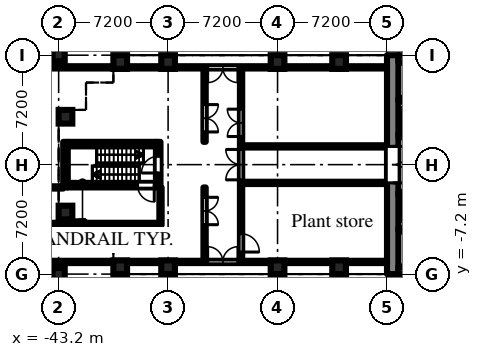
"""IFC4 building model, lengths in metres.
Left out: names, types, materials, properties, quantities, classifications, styles, units other than length and angle.
Written with IfcOpenShell. Run it as: python <this file> out.ifc"""

import sys

from ifc_helpers import new_model, si_unit, direction, frame, frame_2d, origin, origin_2d, place, context, subcontext, project, spatial, rectangle, extrude, element, fill, save


model = new_model("IFC4")
c1 = context("Model", 3, precision=1e-05, world=origin(), true_north=direction((0.0, 1.0)))
c2 = subcontext(c1, "Body", "Model", "MODEL_VIEW")
j1 = project(units=[si_unit("LENGTHUNIT", "METRE"), si_unit("PLANEANGLEUNIT", "RADIAN")], contexts=[c1])
p1 = place(None, origin())
s1 = spatial("IfcSite", under=j1, at=p1, CompositionType="ELEMENT")
p2 = place(p1, origin())
s2 = spatial("IfcBuilding", under=s1, at=p2, CompositionType="ELEMENT")
p3 = place(p2, origin())
s3 = spatial("IfcBuildingStorey", under=s2, at=p3, CompositionType="ELEMENT", Elevation=0.0)
for number, where, z_axis, x_axis in (
    (1, (-42.75, -3.15, 0.0), (0.0, 0.0, 1.0), (1.0, 0.0, 0.0)),
    (2, (-42.75, 3.15, 0.0), (0.0, 0.0, 1.0), (1.0, 0.0, 0.0)),
    (3, (-39.15, -6.75, 0.0), (0.0, 0.0, 1.0), (1.0, 0.0, 0.0)),
    (4, (-39.15, 6.75, 0.0), (0.0, 0.0, 1.0), (1.0, 0.0, 0.0)),
    (5, (-36.0, -6.75, 0.0), (0.0, 0.0, 1.0), (1.0, 0.0, 0.0)),
    (6, (-36.0, 6.75, 0.0), (0.0, 0.0, 1.0), (1.0, 0.0, 0.0)),
    (7, (-28.8, -6.75, 0.0), (0.0, 0.0, 1.0), (1.0, 0.0, 0.0)),
    (8, (-28.8, 6.75, 0.0), (0.0, 0.0, 1.0), (1.0, 0.0, 0.0)),
    (9, (-24.75, -6.75, 0.0), (0.0, 0.0, 1.0), (1.0, 0.0, 0.0)),
    (10, (-24.75, 6.75, 0.0), (0.0, 0.0, 1.0), (1.0, 0.0, 0.0)),
):
    element("IfcColumn", number, at=place(p3, frame(where, z_axis=z_axis, x_axis=x_axis)), inside=s3, PredefinedType="COLUMN", context=c2, shape_type="SweptSolid", body=[
        extrude(rectangle(XDim=0.9, YDim=0.9, at=origin_2d()), origin(), (0.0, 0.0, 1.0), 7.2),
    ])
for number, where, z_axis, x_axis in (
    (11, (-43.2, -7.2, 0.0), (0.0, 0.0, 1.0), (1.0, 0.0, 0.0)),
    (12, (-43.2, 7.2, 0.0), (0.0, 0.0, 1.0), (1.0, 0.0, 0.0)),
):
    element("IfcColumn", number, at=place(p3, frame(where, z_axis=z_axis, x_axis=x_axis)), inside=s3, PredefinedType="COLUMN", context=c2, shape_type="SweptSolid", body=[
        extrude(rectangle(XDim=0.8, YDim=0.8, at=origin_2d()), origin(), (0.0, 0.0, 1.0), 6.6),
    ])
p4 = place(p3, frame((-21.225, -7.2, 0.0), z_axis=(0.0, 0.0, 1.0), x_axis=(0.0, 1.0, 0.0)))
e13 = element("IfcWall", 13, at=p4, inside=s3, PredefinedType="SHEAR", context=c2, shape_type="SweptSolid", body=[
    extrude(rectangle(XDim=14.4, YDim=0.75, at=frame_2d((7.2, 0.0))), origin(), (0.0, 0.0, 1.0), 6.6),
])
p5 = place(p4, frame((6.0, 0.0, 0.0)))
e14 = element("IfcOpeningElement", 14, at=p5, cuts=e13, PredefinedType="OPENING", context=c2, shape_type="SweptSolid", body=[
    extrude(rectangle(XDim=2.4, YDim=2.2, at=frame_2d((1.2, 1.1))), frame((0.0, 0.385, 0.0), z_axis=(0.0, -1.0, 0.0), x_axis=(1.0, 0.0, 0.0)), (0.0, 0.0, 1.0), 0.77),
])
p6 = place(p3, frame((-7.9, 6.95, 0.0), z_axis=(0.0, 0.0, 1.0), x_axis=(-1.0, 0.0, 0.0)))
e15 = element("IfcWall", 15, at=p6, inside=s3, PredefinedType="SHEAR", context=c2, shape_type="SweptSolid", body=[
    extrude(rectangle(XDim=12.95, YDim=0.5, at=frame_2d((6.475, 0.0))), origin(), (0.0, 0.0, 1.0), 6.6),
])
p7 = place(p6, frame((5.35, 0.0, 0.0)))
e16 = element("IfcOpeningElement", 16, at=p7, cuts=e15, PredefinedType="OPENING", context=c2, shape_type="SweptSolid", body=[
    extrude(rectangle(XDim=1.1, YDim=2.1, at=frame_2d((0.55, 1.05))), frame((0.0, 0.26, 0.0), z_axis=(0.0, -1.0, 0.0), x_axis=(1.0, 0.0, 0.0)), (0.0, 0.0, 1.0), 0.52),
])
p8 = place(p3, frame((-7.9, 1.925, 0.0), z_axis=(0.0, 0.0, 1.0), x_axis=(-1.0, 0.0, 0.0)))
e17 = element("IfcWall", 17, at=p8, inside=s3, PredefinedType="SHEAR", context=c2, shape_type="SweptSolid", body=[
    extrude(rectangle(XDim=12.95, YDim=0.25, at=frame_2d((6.475, 0.0))), origin(), (0.0, 0.0, 1.0), 6.6),
])
p9 = place(p8, frame((11.425, 0.0, 0.0)))
e18 = element("IfcOpeningElement", 18, at=p9, cuts=e17, PredefinedType="OPENING", context=c2, shape_type="SweptSolid", body=[
    extrude(rectangle(XDim=1.1, YDim=2.1, at=frame_2d((0.55, 1.05))), frame((0.0, 0.135, 0.0), z_axis=(0.0, -1.0, 0.0), x_axis=(1.0, 0.0, 0.0)), (0.0, 0.0, 1.0), 0.27),
])
p10 = place(p8, frame((0.525, 0.0, 0.0)))
e19 = element("IfcOpeningElement", 19, at=p10, cuts=e17, PredefinedType="OPENING", context=c2, shape_type="SweptSolid", body=[
    extrude(rectangle(XDim=0.9, YDim=2.1, at=frame_2d((0.45, 1.05))), frame((0.0, 0.135, 0.0), z_axis=(0.0, -1.0, 0.0), x_axis=(1.0, 0.0, 0.0)), (0.0, 0.0, 1.0), 0.27),
])
p11 = place(p8, frame((2.625, 0.0, 0.0)))
e20 = element("IfcOpeningElement", 20, at=p11, cuts=e17, PredefinedType="OPENING", context=c2, shape_type="SweptSolid", body=[
    extrude(rectangle(XDim=1.1, YDim=2.1, at=frame_2d((0.55, 1.05))), frame((0.0, 0.135, 0.0), z_axis=(0.0, -1.0, 0.0), x_axis=(1.0, 0.0, 0.0)), (0.0, 0.0, 1.0), 0.27),
])
p12 = place(p8, frame((7.125, 0.0, 0.0)))
e21 = element("IfcOpeningElement", 21, at=p12, cuts=e17, PredefinedType="OPENING", context=c2, shape_type="SweptSolid", body=[
    extrude(rectangle(XDim=0.9, YDim=2.1, at=frame_2d((0.45, 1.05))), frame((0.0, 0.135, 0.0), z_axis=(0.0, -1.0, 0.0), x_axis=(1.0, 0.0, 0.0)), (0.0, 0.0, 1.0), 0.27),
])
p13 = place(p3, frame((-12.3, 4.275, 0.0), z_axis=(0.0, 0.0, 1.0), x_axis=(-1.0, 0.0, 0.0)))
e22 = element("IfcWall", 22, at=p13, inside=s3, PredefinedType="SHEAR", context=c2, shape_type="SweptSolid", body=[
    extrude(rectangle(XDim=8.55, YDim=0.25, at=frame_2d((4.275, 0.0))), origin(), (0.0, 0.0, 1.0), 6.6),
])
p14 = place(p3, frame((-7.9, -6.95, 0.0), z_axis=(0.0, 0.0, 1.0), x_axis=(-1.0, 0.0, 0.0)))
e23 = element("IfcWall", 23, at=p14, inside=s3, PredefinedType="SHEAR", context=c2, shape_type="SweptSolid", body=[
    extrude(rectangle(XDim=12.95, YDim=0.5, at=frame_2d((6.475, 0.0))), origin(), (0.0, 0.0, 1.0), 6.6),
])
p15 = place(p14, frame((5.35, 0.0, 0.0)))
e24 = element("IfcOpeningElement", 24, at=p15, cuts=e23, PredefinedType="OPENING", context=c2, shape_type="SweptSolid", body=[
    extrude(rectangle(XDim=1.1, YDim=2.1, at=frame_2d((0.55, 1.05))), frame((0.0, 0.26, 0.0), z_axis=(0.0, -1.0, 0.0), x_axis=(1.0, 0.0, 0.0)), (0.0, 0.0, 1.0), 0.52),
])
p16 = place(p3, frame((-7.9, -1.925, 0.0), z_axis=(0.0, 0.0, 1.0), x_axis=(-1.0, 0.0, 0.0)))
e25 = element("IfcWall", 25, at=p16, inside=s3, PredefinedType="SHEAR", context=c2, shape_type="SweptSolid", body=[
    extrude(rectangle(XDim=12.95, YDim=0.25, at=frame_2d((6.475, 0.0))), origin(), (0.0, 0.0, 1.0), 6.6),
])
p17 = place(p16, frame((4.825, 0.0, 0.0)))
e26 = element("IfcOpeningElement", 26, at=p17, cuts=e25, PredefinedType="OPENING", context=c2, shape_type="SweptSolid", body=[
    extrude(rectangle(XDim=1.1, YDim=2.1, at=frame_2d((0.55, 1.05))), frame((0.0, 0.135, 0.0), z_axis=(0.0, -1.0, 0.0), x_axis=(1.0, 0.0, 0.0)), (0.0, 0.0, 1.0), 0.27),
])
p18 = place(p16, frame((7.025, 0.0, 0.0)))
e27 = element("IfcOpeningElement", 27, at=p18, cuts=e25, PredefinedType="OPENING", context=c2, shape_type="SweptSolid", body=[
    extrude(rectangle(XDim=1.1, YDim=2.1, at=frame_2d((0.55, 1.05))), frame((0.0, 0.135, 0.0), z_axis=(0.0, -1.0, 0.0), x_axis=(1.0, 0.0, 0.0)), (0.0, 0.0, 1.0), 0.27),
])
p19 = place(p16, frame((9.225, 0.0, 0.0)))
e28 = element("IfcOpeningElement", 28, at=p19, cuts=e25, PredefinedType="OPENING", context=c2, shape_type="SweptSolid", body=[
    extrude(rectangle(XDim=1.1, YDim=2.1, at=frame_2d((0.55, 1.05))), frame((0.0, 0.135, 0.0), z_axis=(0.0, -1.0, 0.0), x_axis=(1.0, 0.0, 0.0)), (0.0, 0.0, 1.0), 0.27),
])
p20 = place(p16, frame((11.425, 0.0, 0.0)))
e29 = element("IfcOpeningElement", 29, at=p20, cuts=e25, PredefinedType="OPENING", context=c2, shape_type="SweptSolid", body=[
    extrude(rectangle(XDim=1.1, YDim=2.1, at=frame_2d((0.55, 1.05))), frame((0.0, 0.135, 0.0), z_axis=(0.0, -1.0, 0.0), x_axis=(1.0, 0.0, 0.0)), (0.0, 0.0, 1.0), 0.27),
])
p21 = place(p16, frame((0.525, 0.0, 0.0)))
e30 = element("IfcOpeningElement", 30, at=p21, cuts=e25, PredefinedType="OPENING", context=c2, shape_type="SweptSolid", body=[
    extrude(rectangle(XDim=0.9, YDim=2.1, at=frame_2d((0.45, 1.05))), frame((0.0, 0.135, 0.0), z_axis=(0.0, -1.0, 0.0), x_axis=(1.0, 0.0, 0.0)), (0.0, 0.0, 1.0), 0.27),
])
p22 = place(p16, frame((2.625, 0.0, 0.0)))
e31 = element("IfcOpeningElement", 31, at=p22, cuts=e25, PredefinedType="OPENING", context=c2, shape_type="SweptSolid", body=[
    extrude(rectangle(XDim=1.1, YDim=2.1, at=frame_2d((0.55, 1.05))), frame((0.0, 0.135, 0.0), z_axis=(0.0, -1.0, 0.0), x_axis=(1.0, 0.0, 0.0)), (0.0, 0.0, 1.0), 0.27),
])
p23 = place(p3, frame((-12.3, -4.275, 0.0), z_axis=(0.0, 0.0, 1.0), x_axis=(-1.0, 0.0, 0.0)))
e32 = element("IfcWall", 32, at=p23, inside=s3, PredefinedType="SHEAR", context=c2, shape_type="SweptSolid", body=[
    extrude(rectangle(XDim=8.55, YDim=0.25, at=frame_2d((4.275, 0.0))), origin(), (0.0, 0.0, 1.0), 6.6),
])
p24 = place(p3, frame((-36.65, -1.5, 0.0), z_axis=(0.0, 0.0, 1.0), x_axis=(0.0, 1.0, 0.0)))
e33 = element("IfcWall", 33, at=p24, inside=s3, PredefinedType="SHEAR", context=c2, shape_type="SweptSolid", body=[
    extrude(rectangle(XDim=3.0, YDim=0.3, at=frame_2d((1.5, 0.0))), origin(), (0.0, 0.0, 1.0), 6.6),
])
p25 = place(p24, frame((0.95, 0.0, 0.0)))
e34 = element("IfcOpeningElement", 34, at=p25, cuts=e33, PredefinedType="OPENING", context=c2, shape_type="SweptSolid", body=[
    extrude(rectangle(XDim=1.1, YDim=2.1, at=frame_2d((0.55, 1.05))), frame((0.0, 0.16, 0.0), z_axis=(0.0, -1.0, 0.0), x_axis=(1.0, 0.0, 0.0)), (0.0, 0.0, 1.0), 0.32),
])
p26 = place(p3, frame((-42.75, -1.5, 0.0), z_axis=(0.0, 0.0, 1.0), x_axis=(0.0, 1.0, 0.0)))
e35 = element("IfcWall", 35, at=p26, inside=s3, PredefinedType="SHEAR", context=c2, shape_type="SweptSolid", body=[
    extrude(rectangle(XDim=3.0, YDim=0.3, at=frame_2d((1.5, 0.0))), origin(), (0.0, 0.0, 1.0), 6.6),
])
p27 = place(p3, frame((-36.8, -1.35, 0.0), z_axis=(0.0, 0.0, 1.0), x_axis=(-1.0, 0.0, 0.0)))
e36 = element("IfcWall", 36, at=p27, inside=s3, PredefinedType="SHEAR", context=c2, shape_type="SweptSolid", body=[
    extrude(rectangle(XDim=5.8, YDim=0.3, at=frame_2d((2.9, 0.0))), origin(), (0.0, 0.0, 1.0), 6.6),
])
p28 = place(p27, frame((0.11, 0.0, 0.0)))
e37 = element("IfcOpeningElement", 37, at=p28, cuts=e36, PredefinedType="OPENING", context=c2, shape_type="SweptSolid", body=[
    extrude(rectangle(XDim=1.1, YDim=2.1, at=frame_2d((0.55, 1.05))), frame((0.0, 0.16, 0.0), z_axis=(0.0, -1.0, 0.0), x_axis=(1.0, 0.0, 0.0)), (0.0, 0.0, 1.0), 0.32),
])
p29 = place(p3, frame((-36.8, 1.35, 0.0), z_axis=(0.0, 0.0, 1.0), x_axis=(-1.0, 0.0, 0.0)))
e38 = element("IfcWall", 38, at=p29, inside=s3, PredefinedType="SHEAR", context=c2, shape_type="SweptSolid", body=[
    extrude(rectangle(XDim=5.8, YDim=0.3, at=frame_2d((2.9, 0.0))), origin(), (0.0, 0.0, 1.0), 6.6),
])
p30 = place(p3, frame((-50.22, -6.4, 0.0), z_axis=(0.0, 0.0, 1.0), x_axis=(1.0, 0.0, 0.0)))
e39 = element("IfcWall", 39, at=p30, inside=s3, PredefinedType="PARTITIONING", context=c2, shape_type="SweptSolid", body=[
    extrude(rectangle(XDim=28.62, YDim=0.15, at=frame_2d((14.31, 0.0))), origin(), (0.0, 0.0, 1.0), 6.6),
])
p31 = place(p30, frame((16.82, 0.0, 0.0)))
e40 = element("IfcOpeningElement", 40, at=p31, cuts=e39, PredefinedType="OPENING", context=c2, shape_type="SweptSolid", body=[
    extrude(rectangle(XDim=2.0, YDim=2.1, at=frame_2d((1.0, 1.05))), frame((0.0, 0.085, 0.0), z_axis=(0.0, -1.0, 0.0), x_axis=(1.0, 0.0, 0.0)), (0.0, 0.0, 1.0), 0.17),
])
p32 = place(p3, frame((-50.22, -3.9, 0.0), z_axis=(0.0, 0.0, 1.0), x_axis=(1.0, 0.0, 0.0)))
e41 = element("IfcWall", 41, at=p32, inside=s3, PredefinedType="PARTITIONING", context=c2, shape_type="SweptSolid", body=[
    extrude(rectangle(XDim=13.645, YDim=0.15, at=frame_2d((6.823, 0.0))), origin(), (0.0, 0.0, 1.0), 6.6),
])
p33 = place(p3, frame((-50.22, -1.5, 0.0), z_axis=(0.0, 0.0, 1.0), x_axis=(1.0, 0.0, 0.0)))
e42 = element("IfcWall", 42, at=p33, inside=s3, PredefinedType="PARTITIONING", context=c2, shape_type="SweptSolid", body=[
    extrude(rectangle(XDim=7.32, YDim=0.15, at=frame_2d((3.66, 0.0))), origin(), (0.0, 0.0, 1.0), 6.6),
])
p34 = place(p3, frame((-50.22, 6.4, 0.0), z_axis=(0.0, 0.0, 1.0), x_axis=(1.0, 0.0, 0.0)))
e43 = element("IfcWall", 43, at=p34, inside=s3, PredefinedType="PARTITIONING", context=c2, shape_type="SweptSolid", body=[
    extrude(rectangle(XDim=28.62, YDim=0.15, at=frame_2d((14.31, 0.0))), origin(), (0.0, 0.0, 1.0), 6.6),
])
p35 = place(p34, frame((16.82, 0.0, 0.0)))
e44 = element("IfcOpeningElement", 44, at=p35, cuts=e43, PredefinedType="OPENING", context=c2, shape_type="SweptSolid", body=[
    extrude(rectangle(XDim=2.0, YDim=2.1, at=frame_2d((1.0, 1.05))), frame((0.0, 0.085, 0.0), z_axis=(0.0, -1.0, 0.0), x_axis=(1.0, 0.0, 0.0)), (0.0, 0.0, 1.0), 0.17),
])
p36 = place(p3, frame((-36.5, -3.975, 0.0), z_axis=(0.0, 0.0, 1.0), x_axis=(0.0, 1.0, 0.0)))
e45 = element("IfcWall", 45, at=p36, inside=s3, PredefinedType="PARTITIONING", context=c2, shape_type="SweptSolid", body=[
    extrude(rectangle(XDim=2.475, YDim=0.15, at=frame_2d((1.238, 0.0))), origin(), (0.0, 0.0, 1.0), 6.6),
])
p37 = place(p3, frame((-33.6, -6.325, 0.0), z_axis=(0.0, 0.0, 1.0), x_axis=(0.0, 1.0, 0.0)))
e46 = element("IfcWall", 46, at=p37, inside=s3, PredefinedType="PARTITIONING", context=c2, shape_type="SweptSolid", body=[
    extrude(rectangle(XDim=4.825, YDim=0.15, at=frame_2d((2.413, 0.0))), origin(), (0.0, 0.0, 1.0), 6.6),
])
p38 = place(p37, frame((2.375, 0.0, 0.0)))
e47 = element("IfcOpeningElement", 47, at=p38, cuts=e46, PredefinedType="OPENING", context=c2, shape_type="SweptSolid", body=[
    extrude(rectangle(XDim=1.8, YDim=2.1, at=frame_2d((0.9, 1.05))), frame((0.0, 0.085, 0.0), z_axis=(0.0, -1.0, 0.0), x_axis=(1.0, 0.0, 0.0)), (0.0, 0.0, 1.0), 0.17),
])
p39 = place(p3, frame((-33.6, 1.5, 0.0), z_axis=(0.0, 0.0, 1.0), x_axis=(0.0, 1.0, 0.0)))
e48 = element("IfcWall", 48, at=p39, inside=s3, PredefinedType="PARTITIONING", context=c2, shape_type="SweptSolid", body=[
    extrude(rectangle(XDim=4.825, YDim=0.15, at=frame_2d((2.413, 0.0))), origin(), (0.0, 0.0, 1.0), 6.6),
])
p40 = place(p39, frame((0.65, 0.0, 0.0)))
e49 = element("IfcOpeningElement", 49, at=p40, cuts=e48, PredefinedType="OPENING", context=c2, shape_type="SweptSolid", body=[
    extrude(rectangle(XDim=1.8, YDim=2.1, at=frame_2d((0.9, 1.05))), frame((0.0, 0.085, 0.0), z_axis=(0.0, -1.0, 0.0), x_axis=(1.0, 0.0, 0.0)), (0.0, 0.0, 1.0), 0.17),
])
p41 = place(p3, frame((-31.2, -6.325, 0.0), z_axis=(0.0, 0.0, 1.0), x_axis=(0.0, 1.0, 0.0)))
e50 = element("IfcWall", 50, at=p41, inside=s3, PredefinedType="PARTITIONING", context=c2, shape_type="SweptSolid", body=[
    extrude(rectangle(XDim=12.65, YDim=0.15, at=frame_2d((6.325, 0.0))), origin(), (0.0, 0.0, 1.0), 6.6),
])
p42 = place(p41, frame((5.325, 0.0, 0.0)))
e51 = element("IfcOpeningElement", 51, at=p42, cuts=e50, PredefinedType="OPENING", context=c2, shape_type="SweptSolid", body=[
    extrude(rectangle(XDim=2.0, YDim=2.1, at=frame_2d((1.0, 1.05))), frame((0.0, 0.085, 0.0), z_axis=(0.0, -1.0, 0.0), x_axis=(1.0, 0.0, 0.0)), (0.0, 0.0, 1.0), 0.17),
])
p43 = place(p41, frame((8.175, 0.0, 0.0)))
e52 = element("IfcOpeningElement", 52, at=p43, cuts=e50, PredefinedType="OPENING", context=c2, shape_type="SweptSolid", body=[
    extrude(rectangle(XDim=1.8, YDim=2.1, at=frame_2d((0.9, 1.05))), frame((0.0, 0.085, 0.0), z_axis=(0.0, -1.0, 0.0), x_axis=(1.0, 0.0, 0.0)), (0.0, 0.0, 1.0), 0.17),
])
p44 = place(p41, frame((0.575, 0.0, 0.0)))
e53 = element("IfcOpeningElement", 53, at=p44, cuts=e50, PredefinedType="OPENING", context=c2, shape_type="SweptSolid", body=[
    extrude(rectangle(XDim=1.2, YDim=2.1, at=frame_2d((0.6, 1.05))), frame((0.0, 0.085, 0.0), z_axis=(0.0, -1.0, 0.0), x_axis=(1.0, 0.0, 0.0)), (0.0, 0.0, 1.0), 0.17),
])
for number, where, z_axis, x_axis in (
    (54, (-31.125, -1.2, 0.0), (0.0, 0.0, 1.0), (1.0, 0.0, 0.0)),
    (55, (-31.125, 1.2, 0.0), (0.0, 0.0, 1.0), (1.0, 0.0, 0.0)),
):
    element("IfcWall", number, at=place(p3, frame(where, z_axis=z_axis, x_axis=x_axis)), inside=s3, PredefinedType="PARTITIONING", context=c2, shape_type="SweptSolid", body=[
        extrude(rectangle(XDim=9.525, YDim=0.15, at=frame_2d((4.762, 0.0))), origin(), (0.0, 0.0, 1.0), 6.6),
    ])
p45 = place(p5, frame((2.4, 0.0, 0.0), z_axis=(0.0, 0.0, 1.0), x_axis=(-1.0, 0.0, 0.0)))
e56 = element("IfcDoor", 56, at=p45, inside=s3, OperationType="DOUBLE_DOOR_DOUBLE_SWING", PredefinedType="DOOR", context=c2, shape_type="SweptSolid", body=[
    extrude(rectangle(XDim=2.4, YDim=2.2, at=frame_2d((1.2, 1.1))), frame((0.0, 0.025, 0.0), z_axis=(0.0, -1.0, 0.0), x_axis=(1.0, 0.0, 0.0)), (0.0, 0.0, 1.0), 0.05),
])
fill(e14, e56)
p46 = place(p25, origin())
e57 = element("IfcDoor", 57, at=p46, inside=s3, OperationType="SINGLE_SWING_LEFT", PredefinedType="DOOR", context=c2, shape_type="SweptSolid", body=[
    extrude(rectangle(XDim=1.1, YDim=2.1, at=frame_2d((0.55, 1.05))), frame((0.0, 0.025, 0.0), z_axis=(0.0, -1.0, 0.0), x_axis=(1.0, 0.0, 0.0)), (0.0, 0.0, 1.0), 0.05),
])
fill(e34, e57)
p47 = place(p28, origin())
e58 = element("IfcDoor", 58, at=p47, inside=s3, OperationType="SINGLE_SWING_LEFT", PredefinedType="DOOR", context=c2, shape_type="SweptSolid", body=[
    extrude(rectangle(XDim=1.1, YDim=2.1, at=frame_2d((0.55, 1.05))), frame((0.0, 0.025, 0.0), z_axis=(0.0, -1.0, 0.0), x_axis=(1.0, 0.0, 0.0)), (0.0, 0.0, 1.0), 0.05),
])
fill(e37, e58)
p48 = place(p40, frame((1.8, 0.0, 0.0), z_axis=(0.0, 0.0, 1.0), x_axis=(-1.0, 0.0, 0.0)))
e59 = element("IfcDoor", 59, at=p48, inside=s3, OperationType="DOUBLE_DOOR_DOUBLE_SWING", PredefinedType="DOOR", context=c2, shape_type="SweptSolid", body=[
    extrude(rectangle(XDim=1.8, YDim=2.1, at=frame_2d((0.9, 1.05))), frame((0.0, 0.025, 0.0), z_axis=(0.0, -1.0, 0.0), x_axis=(1.0, 0.0, 0.0)), (0.0, 0.0, 1.0), 0.05),
])
fill(e49, e59)
p49 = place(p35, frame((2.0, 0.0, 0.0), z_axis=(0.0, 0.0, 1.0), x_axis=(-1.0, 0.0, 0.0)))
e60 = element("IfcDoor", 60, at=p49, inside=s3, OperationType="DOUBLE_DOOR_DOUBLE_SWING", PredefinedType="DOOR", context=c2, shape_type="SweptSolid", body=[
    extrude(rectangle(XDim=2.0, YDim=2.1, at=frame_2d((1.0, 1.05))), frame((0.0, 0.025, 0.0), z_axis=(0.0, -1.0, 0.0), x_axis=(1.0, 0.0, 0.0)), (0.0, 0.0, 1.0), 0.05),
])
fill(e44, e60)
p50 = place(p38, frame((1.8, 0.0, 0.0), z_axis=(0.0, 0.0, 1.0), x_axis=(-1.0, 0.0, 0.0)))
e61 = element("IfcDoor", 61, at=p50, inside=s3, OperationType="DOUBLE_DOOR_DOUBLE_SWING", PredefinedType="DOOR", context=c2, shape_type="SweptSolid", body=[
    extrude(rectangle(XDim=1.8, YDim=2.1, at=frame_2d((0.9, 1.05))), frame((0.0, 0.025, 0.0), z_axis=(0.0, -1.0, 0.0), x_axis=(1.0, 0.0, 0.0)), (0.0, 0.0, 1.0), 0.05),
])
fill(e47, e61)
p51 = place(p31, origin())
e62 = element("IfcDoor", 62, at=p51, inside=s3, OperationType="DOUBLE_DOOR_DOUBLE_SWING", PredefinedType="DOOR", context=c2, shape_type="SweptSolid", body=[
    extrude(rectangle(XDim=2.0, YDim=2.1, at=frame_2d((1.0, 1.05))), frame((0.0, 0.025, 0.0), z_axis=(0.0, -1.0, 0.0), x_axis=(1.0, 0.0, 0.0)), (0.0, 0.0, 1.0), 0.05),
])
fill(e40, e62)
p52 = place(p42, origin())
e63 = element("IfcDoor", 63, at=p52, inside=s3, OperationType="DOUBLE_DOOR_DOUBLE_SWING", PredefinedType="DOOR", context=c2, shape_type="SweptSolid", body=[
    extrude(rectangle(XDim=2.0, YDim=2.1, at=frame_2d((1.0, 1.05))), frame((0.0, 0.025, 0.0), z_axis=(0.0, -1.0, 0.0), x_axis=(1.0, 0.0, 0.0)), (0.0, 0.0, 1.0), 0.05),
])
fill(e51, e63)
p53 = place(p43, origin())
e64 = element("IfcDoor", 64, at=p53, inside=s3, OperationType="DOUBLE_DOOR_DOUBLE_SWING", PredefinedType="DOOR", context=c2, shape_type="SweptSolid", body=[
    extrude(rectangle(XDim=1.8, YDim=2.1, at=frame_2d((0.9, 1.05))), frame((0.0, 0.025, 0.0), z_axis=(0.0, -1.0, 0.0), x_axis=(1.0, 0.0, 0.0)), (0.0, 0.0, 1.0), 0.05),
])
fill(e52, e64)
p54 = place(p44, frame((1.2, 0.0, 0.0), z_axis=(0.0, 0.0, 1.0), x_axis=(-1.0, 0.0, 0.0)))
e65 = element("IfcDoor", 65, at=p54, inside=s3, OperationType="SINGLE_SWING_RIGHT", PredefinedType="DOOR", context=c2, shape_type="SweptSolid", body=[
    extrude(rectangle(XDim=1.2, YDim=2.1, at=frame_2d((0.6, 1.05))), frame((0.0, 0.025, 0.0), z_axis=(0.0, -1.0, 0.0), x_axis=(1.0, 0.0, 0.0)), (0.0, 0.0, 1.0), 0.05),
])
fill(e53, e65)
save(model, sys.argv[1])
